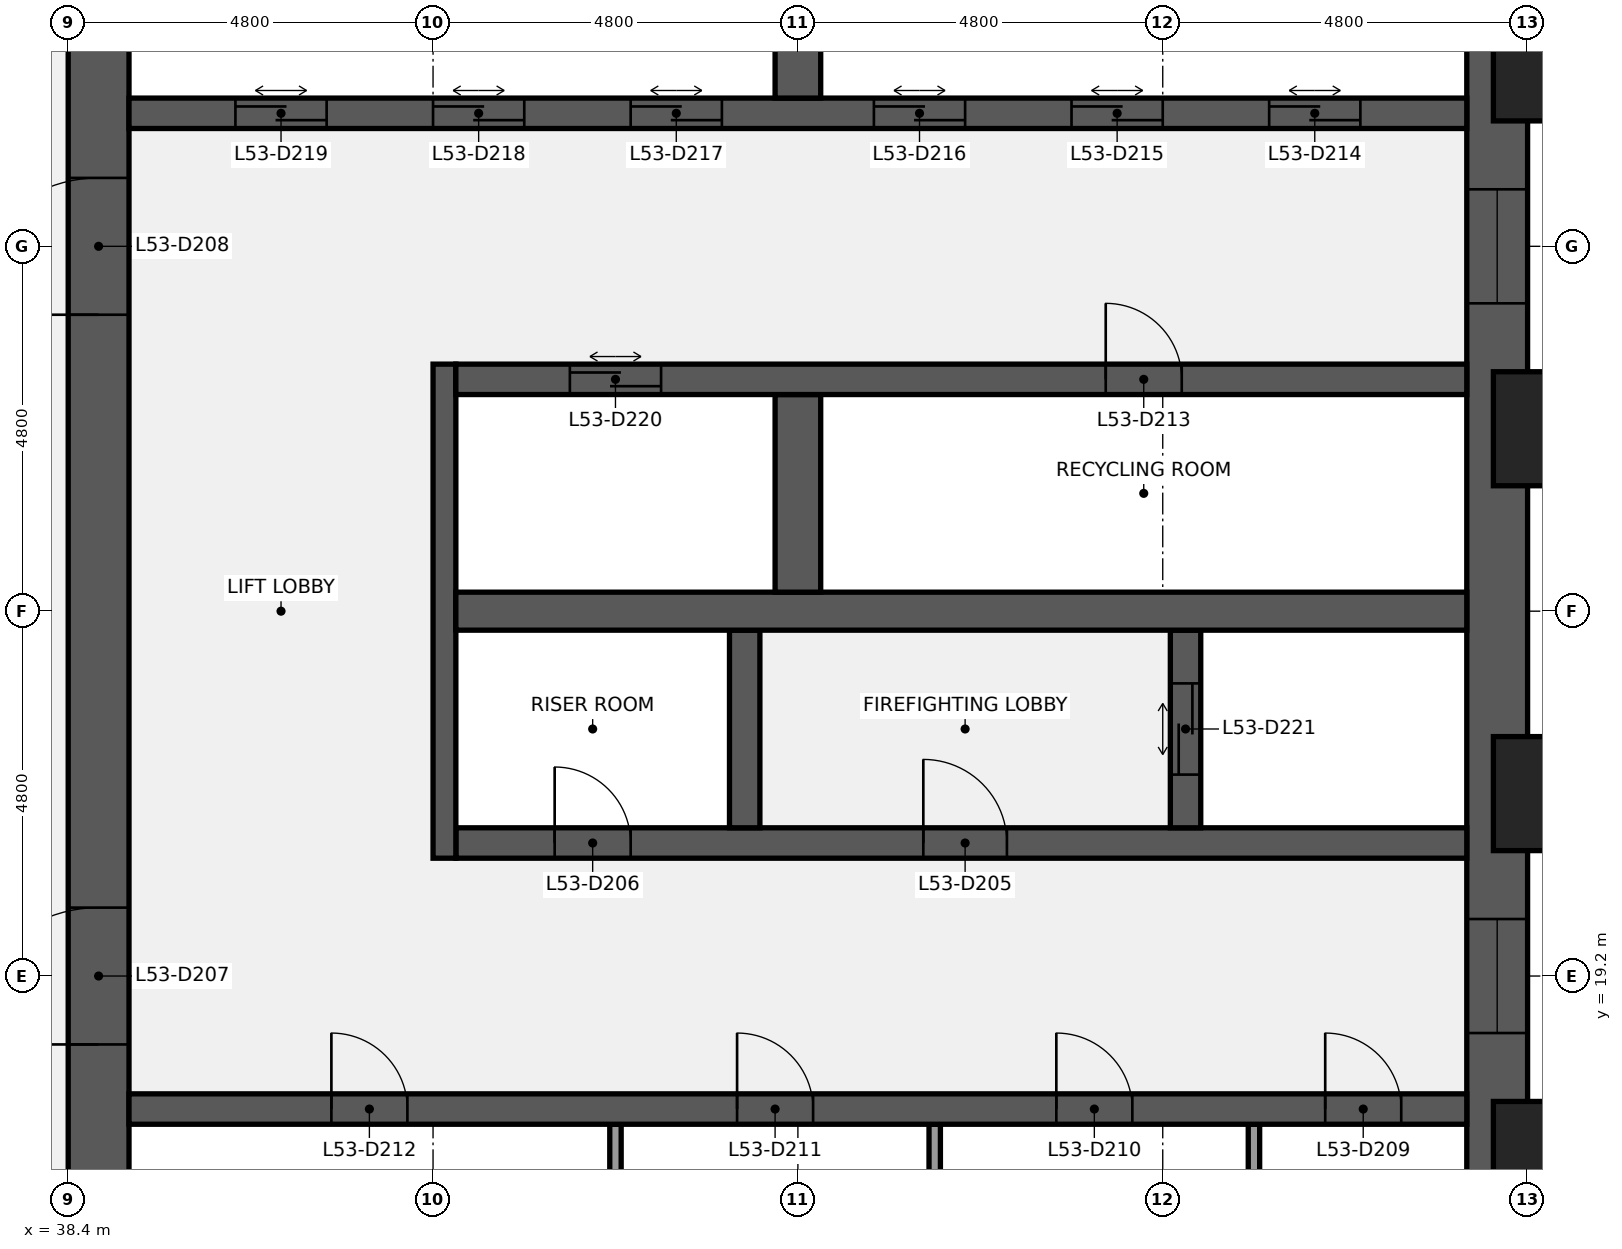
"""IFC4 building model, lengths in metres.
Left out: names, types, materials, properties, quantities, classifications, styles, units other than length and angle.
Written with IfcOpenShell. Run it as: python <this file> out.ifc"""

import sys

from ifc_helpers import new_model, si_unit, direction, frame, frame_2d, origin, origin_2d, place, context, subcontext, project, spatial, rectangle, extrude, element, fill, save


model = new_model("IFC4")
c1 = context("Model", 3, precision=1e-05, world=origin(), true_north=direction((0.0, 1.0)))
c2 = subcontext(c1, "Body", "Model", "MODEL_VIEW")
j1 = project(units=[si_unit("LENGTHUNIT", "METRE"), si_unit("PLANEANGLEUNIT", "RADIAN")], contexts=[c1])
p1 = place(None, origin())
s1 = spatial("IfcSite", under=j1, at=p1, CompositionType="ELEMENT")
p2 = place(p1, origin())
s2 = spatial("IfcBuilding", under=s1, at=p2, CompositionType="ELEMENT")
p3 = place(p2, frame((0.0, 0.0, 241.2)))
s3 = spatial("IfcBuildingStorey", under=s2, at=p3, CompositionType="ELEMENT", Elevation=241.2)
p4 = place(p3, frame((57.2, 38.4, 0.0), z_axis=(0.0, 0.0, 1.0), x_axis=(0.0, -1.0, 0.0)))
e1 = element("IfcWall", 1, at=p4, inside=s3, PredefinedType="SHEAR", context=c2, shape_type="SweptSolid", body=[
    extrude(rectangle(XDim=28.8, YDim=0.8, at=frame_2d((14.4, 0.0))), origin(), (0.0, 0.0, 1.0), 3.84),
])
p5 = place(p4, frame((18.45, 0.0, 0.9)))
e2 = element("IfcOpeningElement", 2, at=p5, cuts=e1, PredefinedType="OPENING", context=c2, shape_type="SweptSolid", body=[
    extrude(rectangle(XDim=1.5, YDim=1.5, at=frame_2d((0.75, 0.75))), frame((0.0, 0.41, 0.0), z_axis=(0.0, -1.0, 0.0), x_axis=(1.0, 0.0, 0.0)), (0.0, 0.0, 1.0), 0.82),
])
p6 = place(p4, frame((8.85, 0.0, 0.9)))
e3 = element("IfcOpeningElement", 3, at=p6, cuts=e1, PredefinedType="OPENING", context=c2, shape_type="SweptSolid", body=[
    extrude(rectangle(XDim=1.5, YDim=1.5, at=frame_2d((0.75, 0.75))), frame((0.0, 0.41, 0.0), z_axis=(0.0, -1.0, 0.0), x_axis=(1.0, 0.0, 0.0)), (0.0, 0.0, 1.0), 0.82),
])
p7 = place(p3, frame((38.8, 9.6, 0.0), z_axis=(0.0, 0.0, 1.0), x_axis=(0.0, 1.0, 0.0)))
e4 = element("IfcWall", 4, at=p7, inside=s3, PredefinedType="SHEAR", context=c2, shape_type="SweptSolid", body=[
    extrude(rectangle(XDim=28.8, YDim=0.8, at=frame_2d((14.4, 0.0))), origin(), (0.0, 0.0, 1.0), 3.84),
])
p8 = place(p7, frame((8.7, 0.0, 0.0)))
e5 = element("IfcOpeningElement", 5, at=p8, cuts=e4, PredefinedType="OPENING", context=c2, shape_type="SweptSolid", body=[
    extrude(rectangle(XDim=1.8, YDim=2.1, at=frame_2d((0.9, 1.05))), frame((0.0, 0.41, 0.0), z_axis=(0.0, -1.0, 0.0), x_axis=(1.0, 0.0, 0.0)), (0.0, 0.0, 1.0), 0.82),
])
p9 = place(p7, frame((18.3, 0.0, 0.0)))
e6 = element("IfcOpeningElement", 6, at=p9, cuts=e4, PredefinedType="OPENING", context=c2, shape_type="SweptSolid", body=[
    extrude(rectangle(XDim=1.8, YDim=2.1, at=frame_2d((0.9, 1.05))), frame((0.0, 0.41, 0.0), z_axis=(0.0, -1.0, 0.0), x_axis=(1.0, 0.0, 0.0)), (0.0, 0.0, 1.0), 0.82),
])
for number, where, z_axis, x_axis in (
    (7, (54.0, 14.65, 0.0), (0.0, 0.0, 1.0), (0.0, 1.0, 0.0)),
    (8, (49.8, 14.65, 0.0), (0.0, 0.0, 1.0), (0.0, 1.0, 0.0)),
    (9, (45.6, 14.65, 0.0), (0.0, 0.0, 1.0), (0.0, 1.0, 0.0)),
):
    element("IfcWall", number, at=place(p3, frame(where, z_axis=z_axis, x_axis=x_axis)), inside=s3, PredefinedType="PARTITIONING", context=c2, shape_type="SweptSolid", body=[
        extrude(rectangle(XDim=2.6, YDim=0.15, at=frame_2d((1.3, 0.0))), origin(), (0.0, 0.0, 1.0), 3.84),
    ])
p10 = place(p3, frame((39.2, 17.45, 0.0), z_axis=(0.0, 0.0, 1.0), x_axis=(1.0, 0.0, 0.0)))
e10 = element("IfcWall", 10, at=p10, inside=s3, PredefinedType="SHEAR", context=c2, shape_type="SweptSolid", body=[
    extrude(rectangle(XDim=17.6, YDim=0.4, at=frame_2d((8.8, 0.0))), origin(), (0.0, 0.0, 1.0), 3.84),
])
p11 = place(p10, frame((15.738, 0.0, 0.0)))
e11 = element("IfcOpeningElement", 11, at=p11, cuts=e10, PredefinedType="OPENING", context=c2, shape_type="SweptSolid", body=[
    extrude(rectangle(XDim=1.0, YDim=2.1, at=frame_2d((0.5, 1.05))), frame((0.0, 0.21, 0.0), z_axis=(0.0, -1.0, 0.0), x_axis=(1.0, 0.0, 0.0)), (0.0, 0.0, 1.0), 0.42),
])
p12 = place(p10, frame((12.2, 0.0, 0.0)))
e12 = element("IfcOpeningElement", 12, at=p12, cuts=e10, PredefinedType="OPENING", context=c2, shape_type="SweptSolid", body=[
    extrude(rectangle(XDim=1.0, YDim=2.1, at=frame_2d((0.5, 1.05))), frame((0.0, 0.21, 0.0), z_axis=(0.0, -1.0, 0.0), x_axis=(1.0, 0.0, 0.0)), (0.0, 0.0, 1.0), 0.42),
])
p13 = place(p10, frame((8.0, 0.0, 0.0)))
e13 = element("IfcOpeningElement", 13, at=p13, cuts=e10, PredefinedType="OPENING", context=c2, shape_type="SweptSolid", body=[
    extrude(rectangle(XDim=1.0, YDim=2.1, at=frame_2d((0.5, 1.05))), frame((0.0, 0.21, 0.0), z_axis=(0.0, -1.0, 0.0), x_axis=(1.0, 0.0, 0.0)), (0.0, 0.0, 1.0), 0.42),
])
p14 = place(p10, frame((2.663, 0.0, 0.0)))
e14 = element("IfcOpeningElement", 14, at=p14, cuts=e10, PredefinedType="OPENING", context=c2, shape_type="SweptSolid", body=[
    extrude(rectangle(XDim=1.0, YDim=2.1, at=frame_2d((0.5, 1.05))), frame((0.0, 0.21, 0.0), z_axis=(0.0, -1.0, 0.0), x_axis=(1.0, 0.0, 0.0)), (0.0, 0.0, 1.0), 0.42),
])
p15 = place(p3, frame((43.5, 20.95, 0.0), z_axis=(0.0, 0.0, 1.0), x_axis=(1.0, 0.0, 0.0)))
e15 = element("IfcWall", 15, at=p15, inside=s3, PredefinedType="SHEAR", context=c2, shape_type="SweptSolid", body=[
    extrude(rectangle(XDim=13.3, YDim=0.4, at=frame_2d((6.65, 0.0))), origin(), (0.0, 0.0, 1.0), 3.84),
])
p16 = place(p15, frame((6.15, 0.0, 0.0)))
e16 = element("IfcOpeningElement", 16, at=p16, cuts=e15, PredefinedType="OPENING", context=c2, shape_type="SweptSolid", body=[
    extrude(rectangle(XDim=1.1, YDim=2.1, at=frame_2d((0.55, 1.05))), frame((0.0, 0.21, 0.0), z_axis=(0.0, -1.0, 0.0), x_axis=(1.0, 0.0, 0.0)), (0.0, 0.0, 1.0), 0.42),
])
p17 = place(p15, frame((1.3, 0.0, 0.0)))
e17 = element("IfcOpeningElement", 17, at=p17, cuts=e15, PredefinedType="OPENING", context=c2, shape_type="SweptSolid", body=[
    extrude(rectangle(XDim=1.0, YDim=2.1, at=frame_2d((0.5, 1.05))), frame((0.0, 0.21, 0.0), z_axis=(0.0, -1.0, 0.0), x_axis=(1.0, 0.0, 0.0)), (0.0, 0.0, 1.0), 0.42),
])
p18 = place(p3, frame((43.35, 20.75, 0.0), z_axis=(0.0, 0.0, 1.0), x_axis=(0.0, 1.0, 0.0)))
e18 = element("IfcWall", 18, at=p18, inside=s3, PredefinedType="SHEAR", context=c2, shape_type="SweptSolid", body=[
    extrude(rectangle(XDim=6.5, YDim=0.3, at=frame_2d((3.25, 0.0))), origin(), (0.0, 0.0, 1.0), 3.84),
])
p19 = place(p3, frame((53.1, 21.15, 0.0), z_axis=(0.0, 0.0, 1.0), x_axis=(0.0, 1.0, 0.0)))
e19 = element("IfcWall", 19, at=p19, inside=s3, PredefinedType="SHEAR", context=c2, shape_type="SweptSolid", body=[
    extrude(rectangle(XDim=2.6, YDim=0.4, at=frame_2d((1.3, 0.0))), origin(), (0.0, 0.0, 1.0), 3.84),
])
p20 = place(p19, frame((0.7, 0.0, 0.0)))
e20 = element("IfcOpeningElement", 20, at=p20, cuts=e19, PredefinedType="OPENING", context=c2, shape_type="SweptSolid", body=[
    extrude(rectangle(XDim=1.2, YDim=2.1, at=frame_2d((0.6, 1.05))), frame((0.0, 0.21, 0.0), z_axis=(0.0, -1.0, 0.0), x_axis=(1.0, 0.0, 0.0)), (0.0, 0.0, 1.0), 0.42),
])
p21 = place(p3, frame((47.3, 21.15, 0.0), z_axis=(0.0, 0.0, 1.0), x_axis=(0.0, 1.0, 0.0)))
e21 = element("IfcWall", 21, at=p21, inside=s3, PredefinedType="SHEAR", context=c2, shape_type="SweptSolid", body=[
    extrude(rectangle(XDim=2.6, YDim=0.4, at=frame_2d((1.3, 0.0))), origin(), (0.0, 0.0, 1.0), 3.84),
])
p22 = place(p3, frame((43.5, 24.0, 0.0), z_axis=(0.0, 0.0, 1.0), x_axis=(1.0, 0.0, 0.0)))
e22 = element("IfcWall", 22, at=p22, inside=s3, PredefinedType="SHEAR", context=c2, shape_type="SweptSolid", body=[
    extrude(rectangle(XDim=13.3, YDim=0.5, at=frame_2d((6.65, 0.0))), origin(), (0.0, 0.0, 1.0), 3.84),
])
p23 = place(p3, frame((48.0, 24.25, 0.0), z_axis=(0.0, 0.0, 1.0), x_axis=(0.0, 1.0, 0.0)))
e23 = element("IfcWall", 23, at=p23, inside=s3, PredefinedType="SHEAR", context=c2, shape_type="SweptSolid", body=[
    extrude(rectangle(XDim=2.6, YDim=0.6, at=frame_2d((1.3, 0.0))), origin(), (0.0, 0.0, 1.0), 3.84),
])
p24 = place(p3, frame((43.5, 27.05, 0.0), z_axis=(0.0, 0.0, 1.0), x_axis=(1.0, 0.0, 0.0)))
e24 = element("IfcWall", 24, at=p24, inside=s3, PredefinedType="SHEAR", context=c2, shape_type="SweptSolid", body=[
    extrude(rectangle(XDim=13.3, YDim=0.4, at=frame_2d((6.65, 0.0))), origin(), (0.0, 0.0, 1.0), 3.84),
])
p25 = place(p24, frame((8.55, 0.0, 0.0)))
e25 = element("IfcOpeningElement", 25, at=p25, cuts=e24, PredefinedType="OPENING", context=c2, shape_type="SweptSolid", body=[
    extrude(rectangle(XDim=1.0, YDim=2.1, at=frame_2d((0.5, 1.05))), frame((0.0, 0.21, 0.0), z_axis=(0.0, -1.0, 0.0), x_axis=(1.0, 0.0, 0.0)), (0.0, 0.0, 1.0), 0.42),
])
p26 = place(p24, frame((1.5, 0.0, 0.0)))
e26 = element("IfcOpeningElement", 26, at=p26, cuts=e24, PredefinedType="OPENING", context=c2, shape_type="SweptSolid", body=[
    extrude(rectangle(XDim=1.2, YDim=2.1, at=frame_2d((0.6, 1.05))), frame((0.0, 0.21, 0.0), z_axis=(0.0, -1.0, 0.0), x_axis=(1.0, 0.0, 0.0)), (0.0, 0.0, 1.0), 0.42),
])
p27 = place(p3, frame((39.2, 30.55, 0.0), z_axis=(0.0, 0.0, 1.0), x_axis=(1.0, 0.0, 0.0)))
e27 = element("IfcWall", 27, at=p27, inside=s3, PredefinedType="SHEAR", context=c2, shape_type="SweptSolid", body=[
    extrude(rectangle(XDim=17.6, YDim=0.4, at=frame_2d((8.8, 0.0))), origin(), (0.0, 0.0, 1.0), 3.84),
])
p28 = place(p27, frame((15.0, 0.0, 0.0)))
e28 = element("IfcOpeningElement", 28, at=p28, cuts=e27, PredefinedType="OPENING", context=c2, shape_type="SweptSolid", body=[
    extrude(rectangle(XDim=1.2, YDim=2.1, at=frame_2d((0.6, 1.05))), frame((0.0, 0.21, 0.0), z_axis=(0.0, -1.0, 0.0), x_axis=(1.0, 0.0, 0.0)), (0.0, 0.0, 1.0), 0.42),
])
p29 = place(p27, frame((12.4, 0.0, 0.0)))
e29 = element("IfcOpeningElement", 29, at=p29, cuts=e27, PredefinedType="OPENING", context=c2, shape_type="SweptSolid", body=[
    extrude(rectangle(XDim=1.2, YDim=2.1, at=frame_2d((0.6, 1.05))), frame((0.0, 0.21, 0.0), z_axis=(0.0, -1.0, 0.0), x_axis=(1.0, 0.0, 0.0)), (0.0, 0.0, 1.0), 0.42),
])
p30 = place(p27, frame((9.8, 0.0, 0.0)))
e30 = element("IfcOpeningElement", 30, at=p30, cuts=e27, PredefinedType="OPENING", context=c2, shape_type="SweptSolid", body=[
    extrude(rectangle(XDim=1.2, YDim=2.1, at=frame_2d((0.6, 1.05))), frame((0.0, 0.21, 0.0), z_axis=(0.0, -1.0, 0.0), x_axis=(1.0, 0.0, 0.0)), (0.0, 0.0, 1.0), 0.42),
])
p31 = place(p27, frame((6.6, 0.0, 0.0)))
e31 = element("IfcOpeningElement", 31, at=p31, cuts=e27, PredefinedType="OPENING", context=c2, shape_type="SweptSolid", body=[
    extrude(rectangle(XDim=1.2, YDim=2.1, at=frame_2d((0.6, 1.05))), frame((0.0, 0.21, 0.0), z_axis=(0.0, -1.0, 0.0), x_axis=(1.0, 0.0, 0.0)), (0.0, 0.0, 1.0), 0.42),
])
p32 = place(p27, frame((4.0, 0.0, 0.0)))
e32 = element("IfcOpeningElement", 32, at=p32, cuts=e27, PredefinedType="OPENING", context=c2, shape_type="SweptSolid", body=[
    extrude(rectangle(XDim=1.2, YDim=2.1, at=frame_2d((0.6, 1.05))), frame((0.0, 0.21, 0.0), z_axis=(0.0, -1.0, 0.0), x_axis=(1.0, 0.0, 0.0)), (0.0, 0.0, 1.0), 0.42),
])
p33 = place(p27, frame((1.4, 0.0, 0.0)))
e33 = element("IfcOpeningElement", 33, at=p33, cuts=e27, PredefinedType="OPENING", context=c2, shape_type="SweptSolid", body=[
    extrude(rectangle(XDim=1.2, YDim=2.1, at=frame_2d((0.6, 1.05))), frame((0.0, 0.21, 0.0), z_axis=(0.0, -1.0, 0.0), x_axis=(1.0, 0.0, 0.0)), (0.0, 0.0, 1.0), 0.42),
])
p34 = place(p3, frame((48.0, 30.75, 0.0), z_axis=(0.0, 0.0, 1.0), x_axis=(0.0, 1.0, 0.0)))
e34 = element("IfcWall", 34, at=p34, inside=s3, PredefinedType="SHEAR", context=c2, shape_type="SweptSolid", body=[
    extrude(rectangle(XDim=2.6, YDim=0.6, at=frame_2d((1.3, 0.0))), origin(), (0.0, 0.0, 1.0), 3.84),
])
for number, where, z_axis, x_axis in (
    (35, (58.35, 16.8, 0.0), (0.0, 0.0, 1.0), (0.0, 1.0, 0.0)),
    (36, (58.35, 21.6, 0.0), (0.0, 0.0, 1.0), (0.0, 1.0, 0.0)),
    (37, (58.35, 26.4, 0.0), (0.0, 0.0, 1.0), (0.0, 1.0, 0.0)),
    (38, (58.35, 31.2, 0.0), (0.0, 0.0, 1.0), (0.0, 1.0, 0.0)),
):
    element("IfcColumn", number, at=place(p3, frame(where, z_axis=z_axis, x_axis=x_axis)), inside=s3, PredefinedType="PILASTER", context=c2, shape_type="SweptSolid", body=[
        extrude(rectangle(XDim=2.4, YDim=1.5, at=origin_2d()), origin(), (0.0, 0.0, 1.0), 4.0),
    ])
p35 = place(p16, origin())
e39 = element("IfcDoor", 39, at=p35, inside=s3, OperationType="SINGLE_SWING_LEFT", PredefinedType="DOOR", context=c2, shape_type="SweptSolid", body=[
    extrude(rectangle(XDim=1.1, YDim=2.1, at=frame_2d((0.55, 1.05))), frame((0.0, 0.025, 0.0), z_axis=(0.0, -1.0, 0.0), x_axis=(1.0, 0.0, 0.0)), (0.0, 0.0, 1.0), 0.05),
])
fill(e16, e39)
p36 = place(p17, origin())
e40 = element("IfcDoor", 40, at=p36, inside=s3, OperationType="SINGLE_SWING_LEFT", PredefinedType="DOOR", context=c2, shape_type="SweptSolid", body=[
    extrude(rectangle(XDim=1.0, YDim=2.1, at=frame_2d((0.5, 1.05))), frame((0.0, 0.025, 0.0), z_axis=(0.0, -1.0, 0.0), x_axis=(1.0, 0.0, 0.0)), (0.0, 0.0, 1.0), 0.05),
])
fill(e17, e40)
p37 = place(p8, origin())
e41 = element("IfcDoor", 41, at=p37, inside=s3, OperationType="DOUBLE_DOOR_SINGLE_SWING", PredefinedType="DOOR", context=c2, shape_type="SweptSolid", body=[
    extrude(rectangle(XDim=1.8, YDim=2.1, at=frame_2d((0.9, 1.05))), frame((0.0, 0.025, 0.0), z_axis=(0.0, -1.0, 0.0), x_axis=(1.0, 0.0, 0.0)), (0.0, 0.0, 1.0), 0.05),
])
fill(e5, e41)
p38 = place(p9, origin())
e42 = element("IfcDoor", 42, at=p38, inside=s3, OperationType="DOUBLE_DOOR_SINGLE_SWING", PredefinedType="DOOR", context=c2, shape_type="SweptSolid", body=[
    extrude(rectangle(XDim=1.8, YDim=2.1, at=frame_2d((0.9, 1.05))), frame((0.0, 0.025, 0.0), z_axis=(0.0, -1.0, 0.0), x_axis=(1.0, 0.0, 0.0)), (0.0, 0.0, 1.0), 0.05),
])
fill(e6, e42)
p39 = place(p11, origin())
e43 = element("IfcDoor", 43, at=p39, inside=s3, OperationType="SINGLE_SWING_LEFT", PredefinedType="DOOR", context=c2, shape_type="SweptSolid", body=[
    extrude(rectangle(XDim=1.0, YDim=2.1, at=frame_2d((0.5, 1.05))), frame((0.0, 0.025, 0.0), z_axis=(0.0, -1.0, 0.0), x_axis=(1.0, 0.0, 0.0)), (0.0, 0.0, 1.0), 0.05),
])
fill(e11, e43)
p40 = place(p12, origin())
e44 = element("IfcDoor", 44, at=p40, inside=s3, OperationType="SINGLE_SWING_LEFT", PredefinedType="DOOR", context=c2, shape_type="SweptSolid", body=[
    extrude(rectangle(XDim=1.0, YDim=2.1, at=frame_2d((0.5, 1.05))), frame((0.0, 0.025, 0.0), z_axis=(0.0, -1.0, 0.0), x_axis=(1.0, 0.0, 0.0)), (0.0, 0.0, 1.0), 0.05),
])
fill(e12, e44)
p41 = place(p13, origin())
e45 = element("IfcDoor", 45, at=p41, inside=s3, OperationType="SINGLE_SWING_LEFT", PredefinedType="DOOR", context=c2, shape_type="SweptSolid", body=[
    extrude(rectangle(XDim=1.0, YDim=2.1, at=frame_2d((0.5, 1.05))), frame((0.0, 0.025, 0.0), z_axis=(0.0, -1.0, 0.0), x_axis=(1.0, 0.0, 0.0)), (0.0, 0.0, 1.0), 0.05),
])
fill(e13, e45)
p42 = place(p14, origin())
e46 = element("IfcDoor", 46, at=p42, inside=s3, OperationType="SINGLE_SWING_LEFT", PredefinedType="DOOR", context=c2, shape_type="SweptSolid", body=[
    extrude(rectangle(XDim=1.0, YDim=2.1, at=frame_2d((0.5, 1.05))), frame((0.0, 0.025, 0.0), z_axis=(0.0, -1.0, 0.0), x_axis=(1.0, 0.0, 0.0)), (0.0, 0.0, 1.0), 0.05),
])
fill(e14, e46)
p43 = place(p25, origin())
e47 = element("IfcDoor", 47, at=p43, inside=s3, OperationType="SINGLE_SWING_LEFT", PredefinedType="DOOR", context=c2, shape_type="SweptSolid", body=[
    extrude(rectangle(XDim=1.0, YDim=2.1, at=frame_2d((0.5, 1.05))), frame((0.0, 0.025, 0.0), z_axis=(0.0, -1.0, 0.0), x_axis=(1.0, 0.0, 0.0)), (0.0, 0.0, 1.0), 0.05),
])
fill(e25, e47)
p44 = place(p28, origin())
e48 = element("IfcDoor", 48, at=p44, inside=s3, OperationType="DOUBLE_DOOR_SLIDING", PredefinedType="DOOR", context=c2, shape_type="SweptSolid", body=[
    extrude(rectangle(XDim=1.2, YDim=2.1, at=frame_2d((0.6, 1.05))), frame((0.0, 0.025, 0.0), z_axis=(0.0, -1.0, 0.0), x_axis=(1.0, 0.0, 0.0)), (0.0, 0.0, 1.0), 0.05),
])
fill(e28, e48)
p45 = place(p29, origin())
e49 = element("IfcDoor", 49, at=p45, inside=s3, OperationType="DOUBLE_DOOR_SLIDING", PredefinedType="DOOR", context=c2, shape_type="SweptSolid", body=[
    extrude(rectangle(XDim=1.2, YDim=2.1, at=frame_2d((0.6, 1.05))), frame((0.0, 0.025, 0.0), z_axis=(0.0, -1.0, 0.0), x_axis=(1.0, 0.0, 0.0)), (0.0, 0.0, 1.0), 0.05),
])
fill(e29, e49)
p46 = place(p30, origin())
e50 = element("IfcDoor", 50, at=p46, inside=s3, OperationType="DOUBLE_DOOR_SLIDING", PredefinedType="DOOR", context=c2, shape_type="SweptSolid", body=[
    extrude(rectangle(XDim=1.2, YDim=2.1, at=frame_2d((0.6, 1.05))), frame((0.0, 0.025, 0.0), z_axis=(0.0, -1.0, 0.0), x_axis=(1.0, 0.0, 0.0)), (0.0, 0.0, 1.0), 0.05),
])
fill(e30, e50)
p47 = place(p31, origin())
e51 = element("IfcDoor", 51, at=p47, inside=s3, OperationType="DOUBLE_DOOR_SLIDING", PredefinedType="DOOR", context=c2, shape_type="SweptSolid", body=[
    extrude(rectangle(XDim=1.2, YDim=2.1, at=frame_2d((0.6, 1.05))), frame((0.0, 0.025, 0.0), z_axis=(0.0, -1.0, 0.0), x_axis=(1.0, 0.0, 0.0)), (0.0, 0.0, 1.0), 0.05),
])
fill(e31, e51)
p48 = place(p32, origin())
e52 = element("IfcDoor", 52, at=p48, inside=s3, OperationType="DOUBLE_DOOR_SLIDING", PredefinedType="DOOR", context=c2, shape_type="SweptSolid", body=[
    extrude(rectangle(XDim=1.2, YDim=2.1, at=frame_2d((0.6, 1.05))), frame((0.0, 0.025, 0.0), z_axis=(0.0, -1.0, 0.0), x_axis=(1.0, 0.0, 0.0)), (0.0, 0.0, 1.0), 0.05),
])
fill(e32, e52)
p49 = place(p33, origin())
e53 = element("IfcDoor", 53, at=p49, inside=s3, OperationType="DOUBLE_DOOR_SLIDING", PredefinedType="DOOR", context=c2, shape_type="SweptSolid", body=[
    extrude(rectangle(XDim=1.2, YDim=2.1, at=frame_2d((0.6, 1.05))), frame((0.0, 0.025, 0.0), z_axis=(0.0, -1.0, 0.0), x_axis=(1.0, 0.0, 0.0)), (0.0, 0.0, 1.0), 0.05),
])
fill(e33, e53)
p50 = place(p26, origin())
e54 = element("IfcDoor", 54, at=p50, inside=s3, OperationType="DOUBLE_DOOR_SLIDING", PredefinedType="DOOR", context=c2, shape_type="SweptSolid", body=[
    extrude(rectangle(XDim=1.2, YDim=2.1, at=frame_2d((0.6, 1.05))), frame((0.0, 0.025, 0.0), z_axis=(0.0, -1.0, 0.0), x_axis=(1.0, 0.0, 0.0)), (0.0, 0.0, 1.0), 0.05),
])
fill(e26, e54)
p51 = place(p20, origin())
e55 = element("IfcDoor", 55, at=p51, inside=s3, OperationType="DOUBLE_DOOR_SLIDING", PredefinedType="DOOR", context=c2, shape_type="SweptSolid", body=[
    extrude(rectangle(XDim=1.2, YDim=2.1, at=frame_2d((0.6, 1.05))), frame((0.0, 0.025, 0.0), z_axis=(0.0, -1.0, 0.0), x_axis=(1.0, 0.0, 0.0)), (0.0, 0.0, 1.0), 0.05),
])
fill(e20, e55)
p52 = place(p5, origin())
e56 = element("IfcWindow", 56, at=p52, inside=s3, PartitioningType="SINGLE_PANEL", PredefinedType="WINDOW", context=c2, shape_type="SweptSolid", body=[
    extrude(rectangle(XDim=1.5, YDim=1.5, at=frame_2d((0.75, 0.75))), frame((0.0, 0.03, 0.0), z_axis=(0.0, -1.0, 0.0), x_axis=(1.0, 0.0, 0.0)), (0.0, 0.0, 1.0), 0.06),
])
fill(e2, e56)
p53 = place(p6, origin())
e57 = element("IfcWindow", 57, at=p53, inside=s3, PartitioningType="SINGLE_PANEL", PredefinedType="WINDOW", context=c2, shape_type="SweptSolid", body=[
    extrude(rectangle(XDim=1.5, YDim=1.5, at=frame_2d((0.75, 0.75))), frame((0.0, 0.03, 0.0), z_axis=(0.0, -1.0, 0.0), x_axis=(1.0, 0.0, 0.0)), (0.0, 0.0, 1.0), 0.06),
])
fill(e3, e57)
save(model, sys.argv[1])
